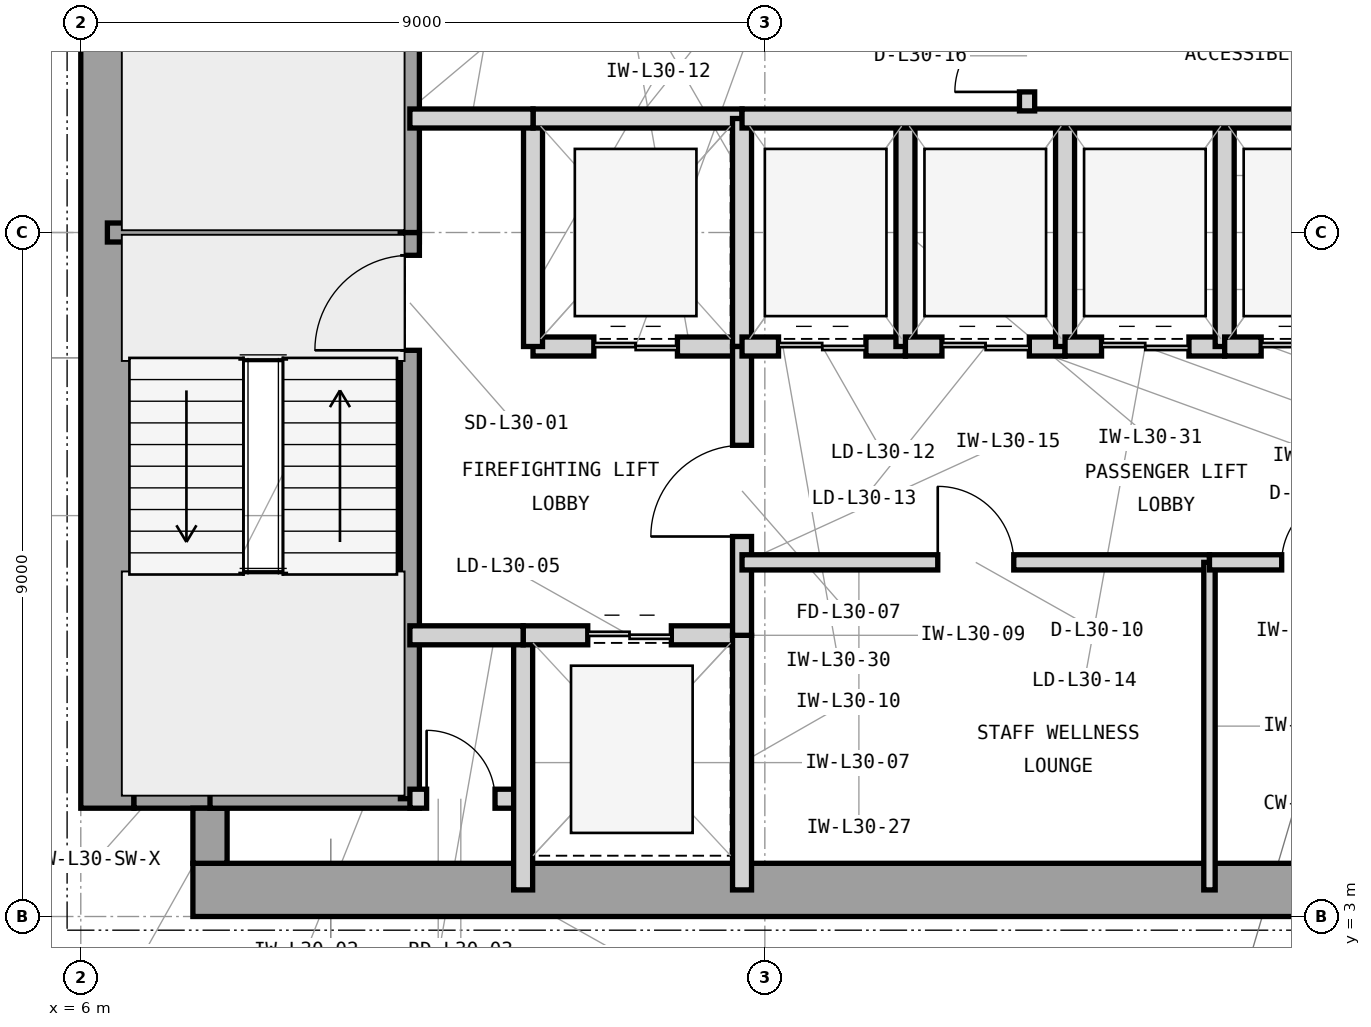
"""IFC4 building model, lengths in metres.
Left out: names, types, materials, properties, quantities, classifications, styles, units other than length and angle.
Written with IfcOpenShell. Run it as: python <this file> out.ifc"""

import sys

from ifc_helpers import new_model, si_unit, direction, frame, frame_2d, origin, place, context, subcontext, project, spatial, rectangle, extrude, element, fill, save


model = new_model("IFC4")
c1 = context("Model", 3, precision=1e-05, world=origin(), true_north=direction((0.0, 1.0)))
c2 = subcontext(c1, "Body", "Model", "MODEL_VIEW")
j1 = project(units=[si_unit("LENGTHUNIT", "METRE"), si_unit("PLANEANGLEUNIT", "RADIAN")], contexts=[c1])
p1 = place(None, origin())
s1 = spatial("IfcSite", under=j1, at=p1, CompositionType="ELEMENT")
p2 = place(p1, origin())
s2 = spatial("IfcBuilding", under=s1, at=p2, CompositionType="ELEMENT")
p3 = place(p2, frame((0.0, 0.0, 128.4)))
s3 = spatial("IfcBuildingStorey", under=s2, at=p3, CompositionType="ELEMENT", Elevation=128.4)
p4 = place(p3, frame((7.475, 3.35, 0.0), z_axis=(0.0, 0.0, 1.0), x_axis=(1.0, 0.0, 0.0)))
e1 = element("IfcWall", 1, at=p4, inside=s3, PredefinedType="SHEAR", context=c2, shape_type="SweptSolid", body=[
    extrude(rectangle(XDim=16.525, YDim=0.7, at=frame_2d((8.262, 0.0))), origin(), (0.0, 0.0, 1.0), 3.9),
])
p5 = place(p3, frame((6.35, 4.425, 0.0), z_axis=(0.0, 0.0, 1.0), x_axis=(0.0, 1.0, 0.0)))
e2 = element("IfcWall", 2, at=p5, inside=s3, PredefinedType="SHEAR", context=c2, shape_type="SweptSolid", body=[
    extrude(rectangle(XDim=15.15, YDim=0.7, at=frame_2d((7.575, 0.0))), origin(), (0.0, 0.0, 1.0), 3.9),
])
p6 = place(p3, frame((6.7, 4.65, 0.0), z_axis=(0.0, 0.0, 1.0), x_axis=(1.0, 0.0, 0.0)))
e3 = element("IfcWall", 3, at=p6, inside=s3, PredefinedType="SHEAR", context=c2, shape_type="SweptSolid", body=[
    extrude(rectangle(XDim=1.225, YDim=0.45, at=frame_2d((0.613, 0.0))), origin(), (0.0, 0.0, 1.0), 3.9),
])
p7 = place(p3, frame((7.7, 3.7, 0.0), z_axis=(0.0, 0.0, 1.0), x_axis=(0.0, 1.0, 0.0)))
e4 = element("IfcWall", 4, at=p7, inside=s3, PredefinedType="SHEAR", context=c2, shape_type="SweptSolid", body=[
    extrude(rectangle(XDim=0.725, YDim=0.45, at=frame_2d((0.363, 0.0))), origin(), (0.0, 0.0, 1.0), 3.9),
])
p8 = place(p3, frame((6.35, 12.0, 0.0), z_axis=(0.0, 0.0, 1.0), x_axis=(1.0, 0.0, 0.0)))
e5 = element("IfcWall", 5, at=p8, inside=s3, PredefinedType="SHEAR", context=c2, shape_type="SweptSolid", body=[
    extrude(rectangle(XDim=4.105, YDim=0.25, at=frame_2d((2.052, 0.0))), origin(), (0.0, 0.0, 1.0), 3.9),
])
p9 = place(p3, frame((7.7, 4.55, 0.0), z_axis=(0.0, 0.0, 1.0), x_axis=(1.0, 0.0, 0.0)))
e6 = element("IfcWall", 6, at=p9, inside=s3, PredefinedType="SHEAR", context=c2, shape_type="SweptSolid", body=[
    extrude(rectangle(XDim=2.755, YDim=0.25, at=frame_2d((1.377, 0.0))), origin(), (0.0, 0.0, 1.0), 3.9),
])
p10 = place(p3, frame((10.33, 4.55, 0.0), z_axis=(0.0, 0.0, 1.0), x_axis=(0.0, 1.0, 0.0)))
e7 = element("IfcWall", 7, at=p10, inside=s3, PredefinedType="SHEAR", context=c2, shape_type="SweptSolid", body=[
    extrude(rectangle(XDim=7.45, YDim=0.25, at=frame_2d((3.725, 0.0))), origin(), (0.0, 0.0, 1.0), 3.9),
])
p11 = place(p10, frame((5.9, 0.0, 0.0)))
e8 = element("IfcOpeningElement", 8, at=p11, cuts=e7, PredefinedType="OPENING", context=c2, shape_type="SweptSolid", body=[
    extrude(rectangle(XDim=1.25, YDim=2.2, at=frame_2d((0.625, 1.1))), frame((0.0, 0.135, 0.0), z_axis=(0.0, -1.0, 0.0), x_axis=(1.0, 0.0, 0.0)), (0.0, 0.0, 1.0), 0.27),
])
p12 = place(p3, frame((10.33, 12.0, 0.0), z_axis=(0.0, 0.0, 1.0), x_axis=(0.0, 1.0, 0.0)))
e9 = element("IfcWall", 9, at=p12, inside=s3, PredefinedType="SHEAR", context=c2, shape_type="SweptSolid", body=[
    extrude(rectangle(XDim=7.45, YDim=0.25, at=frame_2d((3.725, 0.0))), origin(), (0.0, 0.0, 1.0), 3.9),
])
p13 = place(p12, frame((5.85, 0.0, 0.0)))
e10 = element("IfcOpeningElement", 10, at=p13, cuts=e9, PredefinedType="OPENING", context=c2, shape_type="SweptSolid", body=[
    extrude(rectangle(XDim=1.25, YDim=2.2, at=frame_2d((0.625, 1.1))), frame((0.0, 0.135, 0.0), z_axis=(0.0, -1.0, 0.0), x_axis=(1.0, 0.0, 0.0)), (0.0, 0.0, 1.0), 0.27),
])
p14 = place(p3, frame((10.33, 4.55, 0.0), z_axis=(0.0, 0.0, 1.0), x_axis=(1.0, 0.0, 0.0)))
e11 = element("IfcWall", 11, at=p14, inside=s3, PredefinedType="PARTITIONING", context=c2, shape_type="SweptSolid", body=[
    extrude(rectangle(XDim=1.49, YDim=0.25, at=frame_2d((0.745, 0.0))), origin(), (0.0, 0.0, 1.0), 3.69),
])
p15 = place(p14, frame((0.22, 0.0, 0.0)))
e12 = element("IfcOpeningElement", 12, at=p15, cuts=e11, PredefinedType="OPENING", context=c2, shape_type="SweptSolid", body=[
    extrude(rectangle(XDim=0.9, YDim=2.1, at=frame_2d((0.45, 1.05))), frame((0.0, 0.135, 0.0), z_axis=(0.0, -1.0, 0.0), x_axis=(1.0, 0.0, 0.0)), (0.0, 0.0, 1.0), 0.27),
])
p16 = place(p3, frame((11.82, 3.35, 0.0), z_axis=(0.0, 0.0, 1.0), x_axis=(0.0, 1.0, 0.0)))
e13 = element("IfcWall", 13, at=p16, inside=s3, PredefinedType="PARTITIONING", context=c2, shape_type="SweptSolid", body=[
    extrude(rectangle(XDim=3.35, YDim=0.25, at=frame_2d((1.675, 0.0))), origin(), (0.0, 0.0, 1.0), 3.69),
])
p17 = place(p3, frame((11.82, 6.7, 0.0), z_axis=(0.0, 0.0, 1.0), x_axis=(1.0, 0.0, 0.0)))
e14 = element("IfcWall", 14, at=p17, inside=s3, PredefinedType="PARTITIONING", context=c2, shape_type="SweptSolid", body=[
    extrude(rectangle(XDim=2.88, YDim=0.25, at=frame_2d((1.44, 0.0))), origin(), (0.0, 0.0, 1.0), 3.233),
])
p18 = place(p17, frame((0.85, 0.0, 0.0)))
e15 = element("IfcOpeningElement", 15, at=p18, cuts=e14, PredefinedType="OPENING", context=c2, shape_type="SweptSolid", body=[
    extrude(rectangle(XDim=1.1, YDim=2.25, at=frame_2d((0.55, 1.125))), frame((0.0, 0.135, 0.0), z_axis=(0.0, -1.0, 0.0), x_axis=(1.0, 0.0, 0.0)), (0.0, 0.0, 1.0), 0.27),
])
p19 = place(p3, frame((14.7, 3.35, 0.0), z_axis=(0.0, 0.0, 1.0), x_axis=(0.0, 1.0, 0.0)))
e16 = element("IfcWall", 16, at=p19, inside=s3, PredefinedType="PARTITIONING", context=c2, shape_type="SweptSolid", body=[
    extrude(rectangle(XDim=3.35, YDim=0.25, at=frame_2d((1.675, 0.0))), origin(), (0.0, 0.0, 1.0), 3.69),
])
p20 = place(p3, frame((11.95, 10.5, 0.0), z_axis=(0.0, 0.0, 1.0), x_axis=(1.0, 0.0, 0.0)))
e17 = element("IfcWall", 17, at=p20, inside=s3, PredefinedType="PARTITIONING", context=c2, shape_type="SweptSolid", body=[
    extrude(rectangle(XDim=2.75, YDim=0.25, at=frame_2d((1.375, 0.0))), origin(), (0.0, 0.0, 1.0), 3.233),
])
p21 = place(p20, frame((0.8, 0.0, 0.0)))
e18 = element("IfcOpeningElement", 18, at=p21, cuts=e17, PredefinedType="OPENING", context=c2, shape_type="SweptSolid", body=[
    extrude(rectangle(XDim=1.1, YDim=2.25, at=frame_2d((0.55, 1.125))), frame((0.0, 0.135, 0.0), z_axis=(0.0, -1.0, 0.0), x_axis=(1.0, 0.0, 0.0)), (0.0, 0.0, 1.0), 0.27),
])
p22 = place(p3, frame((11.95, 10.5, 0.0), z_axis=(0.0, 0.0, 1.0), x_axis=(0.0, 1.0, 0.0)))
e19 = element("IfcWall", 19, at=p22, inside=s3, PredefinedType="PARTITIONING", context=c2, shape_type="SweptSolid", body=[
    extrude(rectangle(XDim=3.0, YDim=0.25, at=frame_2d((1.5, 0.0))), origin(), (0.0, 0.0, 1.0), 3.69),
])
p23 = place(p3, frame((11.95, 13.5, 0.0), z_axis=(0.0, 0.0, 1.0), x_axis=(1.0, 0.0, 0.0)))
e20 = element("IfcWall", 20, at=p23, inside=s3, PredefinedType="PARTITIONING", context=c2, shape_type="SweptSolid", body=[
    extrude(rectangle(XDim=2.75, YDim=0.25, at=frame_2d((1.375, 0.0))), origin(), (0.0, 0.0, 1.0), 3.233),
])
p24 = place(p3, frame((14.7, 10.5, 0.0), z_axis=(0.0, 0.0, 1.0), x_axis=(0.0, 1.0, 0.0)))
e21 = element("IfcWall", 21, at=p24, inside=s3, PredefinedType="PARTITIONING", context=c2, shape_type="SweptSolid", body=[
    extrude(rectangle(XDim=3.0, YDim=0.25, at=frame_2d((1.5, 0.0))), origin(), (0.0, 0.0, 1.0), 3.69),
])
p25 = place(p3, frame((14.7, 6.7, 0.0), z_axis=(0.0, 0.0, 1.0), x_axis=(0.0, 1.0, 0.0)))
e22 = element("IfcWall", 22, at=p25, inside=s3, PredefinedType="PARTITIONING", context=c2, shape_type="SweptSolid", body=[
    extrude(rectangle(XDim=3.8, YDim=0.25, at=frame_2d((1.9, 0.0))), origin(), (0.0, 0.0, 1.0), 3.69),
])
p26 = place(p25, frame((1.3, 0.0, 0.0)))
e23 = element("IfcOpeningElement", 23, at=p26, cuts=e22, PredefinedType="OPENING", context=c2, shape_type="SweptSolid", body=[
    extrude(rectangle(XDim=1.2, YDim=2.2, at=frame_2d((0.6, 1.1))), frame((0.0, 0.135, 0.0), z_axis=(0.0, -1.0, 0.0), x_axis=(1.0, 0.0, 0.0)), (0.0, 0.0, 1.0), 0.27),
])
p27 = place(p3, frame((10.33, 13.5, 0.0), z_axis=(0.0, 0.0, 1.0), x_axis=(1.0, 0.0, 0.0)))
e24 = element("IfcWall", 24, at=p27, inside=s3, PredefinedType="PARTITIONING", context=c2, shape_type="SweptSolid", body=[
    extrude(rectangle(XDim=1.62, YDim=0.25, at=frame_2d((0.81, 0.0))), origin(), (0.0, 0.0, 1.0), 3.233),
])
p28 = place(p3, frame((10.33, 6.7, 0.0), z_axis=(0.0, 0.0, 1.0), x_axis=(1.0, 0.0, 0.0)))
e25 = element("IfcWall", 25, at=p28, inside=s3, PredefinedType="PARTITIONING", context=c2, shape_type="SweptSolid", body=[
    extrude(rectangle(XDim=1.49, YDim=0.25, at=frame_2d((0.745, 0.0))), origin(), (0.0, 0.0, 1.0), 3.233),
])
p29 = place(p3, frame((14.7, 7.66, 0.0), z_axis=(0.0, 0.0, 1.0), x_axis=(1.0, 0.0, 0.0)))
e26 = element("IfcWall", 26, at=p29, inside=s3, PredefinedType="PARTITIONING", context=c2, shape_type="SweptSolid", body=[
    extrude(rectangle(XDim=6.15, YDim=0.2, at=frame_2d((3.075, 0.0))), origin(), (0.0, 0.0, 1.0), 3.69),
])
p30 = place(p29, frame((2.575, 0.0, 0.0)))
e27 = element("IfcOpeningElement", 27, at=p30, cuts=e26, PredefinedType="OPENING", context=c2, shape_type="SweptSolid", body=[
    extrude(rectangle(XDim=1.0, YDim=2.15, at=frame_2d((0.5, 1.075))), frame((0.0, 0.11, 0.0), z_axis=(0.0, -1.0, 0.0), x_axis=(1.0, 0.0, 0.0)), (0.0, 0.0, 1.0), 0.22),
])
p31 = place(p3, frame((20.85, 3.35, 0.0), z_axis=(0.0, 0.0, 1.0), x_axis=(0.0, 1.0, 0.0)))
e28 = element("IfcWall", 28, at=p31, inside=s3, PredefinedType="PARTITIONING", context=c2, shape_type="SweptSolid", body=[
    extrude(rectangle(XDim=4.31, YDim=0.15, at=frame_2d((2.155, 0.0))), origin(), (0.0, 0.0, 1.0), 3.69),
])
p32 = place(p3, frame((20.85, 7.66, 0.0), z_axis=(0.0, 0.0, 1.0), x_axis=(1.0, 0.0, 0.0)))
e29 = element("IfcWall", 29, at=p32, inside=s3, PredefinedType="PARTITIONING", context=c2, shape_type="SweptSolid", body=[
    extrude(rectangle(XDim=2.8, YDim=0.2, at=frame_2d((1.4, 0.0))), origin(), (0.0, 0.0, 1.0), 3.69),
])
p33 = place(p32, frame((0.95, 0.0, 0.0)))
e30 = element("IfcOpeningElement", 30, at=p33, cuts=e29, PredefinedType="OPENING", context=c2, shape_type="SweptSolid", body=[
    extrude(rectangle(XDim=0.9, YDim=2.1, at=frame_2d((0.45, 1.05))), frame((0.0, 0.11, 0.0), z_axis=(0.0, -1.0, 0.0), x_axis=(1.0, 0.0, 0.0)), (0.0, 0.0, 1.0), 0.22),
])
p34 = place(p3, frame((14.7, 10.5, 0.0), z_axis=(0.0, 0.0, 1.0), x_axis=(1.0, 0.0, 0.0)))
e31 = element("IfcWall", 31, at=p34, inside=s3, PredefinedType="PARTITIONING", context=c2, shape_type="SweptSolid", body=[
    extrude(rectangle(XDim=2.15, YDim=0.25, at=frame_2d((1.075, 0.0))), origin(), (0.0, 0.0, 1.0), 3.233),
])
p35 = place(p34, frame((0.48, 0.0, 0.0)))
e32 = element("IfcOpeningElement", 32, at=p35, cuts=e31, PredefinedType="OPENING", context=c2, shape_type="SweptSolid", body=[
    extrude(rectangle(XDim=1.15, YDim=2.25, at=frame_2d((0.575, 1.125))), frame((0.0, 0.135, 0.0), z_axis=(0.0, -1.0, 0.0), x_axis=(1.0, 0.0, 0.0)), (0.0, 0.0, 1.0), 0.27),
])
p36 = place(p3, frame((16.85, 10.5, 0.0), z_axis=(0.0, 0.0, 1.0), x_axis=(0.0, 1.0, 0.0)))
e33 = element("IfcWall", 33, at=p36, inside=s3, PredefinedType="PARTITIONING", context=c2, shape_type="SweptSolid", body=[
    extrude(rectangle(XDim=3.0, YDim=0.25, at=frame_2d((1.5, 0.0))), origin(), (0.0, 0.0, 1.0), 3.69),
])
p37 = place(p3, frame((16.85, 10.5, 0.0), z_axis=(0.0, 0.0, 1.0), x_axis=(1.0, 0.0, 0.0)))
e34 = element("IfcWall", 34, at=p37, inside=s3, PredefinedType="PARTITIONING", context=c2, shape_type="SweptSolid", body=[
    extrude(rectangle(XDim=2.1, YDim=0.25, at=frame_2d((1.05, 0.0))), origin(), (0.0, 0.0, 1.0), 3.233),
])
p38 = place(p37, frame((0.48, 0.0, 0.0)))
e35 = element("IfcOpeningElement", 35, at=p38, cuts=e34, PredefinedType="OPENING", context=c2, shape_type="SweptSolid", body=[
    extrude(rectangle(XDim=1.15, YDim=2.25, at=frame_2d((0.575, 1.125))), frame((0.0, 0.135, 0.0), z_axis=(0.0, -1.0, 0.0), x_axis=(1.0, 0.0, 0.0)), (0.0, 0.0, 1.0), 0.27),
])
p39 = place(p3, frame((18.95, 10.5, 0.0), z_axis=(0.0, 0.0, 1.0), x_axis=(0.0, 1.0, 0.0)))
e36 = element("IfcWall", 36, at=p39, inside=s3, PredefinedType="PARTITIONING", context=c2, shape_type="SweptSolid", body=[
    extrude(rectangle(XDim=3.0, YDim=0.25, at=frame_2d((1.5, 0.0))), origin(), (0.0, 0.0, 1.0), 3.69),
])
p40 = place(p3, frame((18.95, 10.5, 0.0), z_axis=(0.0, 0.0, 1.0), x_axis=(1.0, 0.0, 0.0)))
e37 = element("IfcWall", 37, at=p40, inside=s3, PredefinedType="PARTITIONING", context=c2, shape_type="SweptSolid", body=[
    extrude(rectangle(XDim=2.1, YDim=0.25, at=frame_2d((1.05, 0.0))), origin(), (0.0, 0.0, 1.0), 3.233),
])
p41 = place(p40, frame((0.48, 0.0, 0.0)))
e38 = element("IfcOpeningElement", 38, at=p41, cuts=e37, PredefinedType="OPENING", context=c2, shape_type="SweptSolid", body=[
    extrude(rectangle(XDim=1.15, YDim=2.25, at=frame_2d((0.575, 1.125))), frame((0.0, 0.135, 0.0), z_axis=(0.0, -1.0, 0.0), x_axis=(1.0, 0.0, 0.0)), (0.0, 0.0, 1.0), 0.27),
])
p42 = place(p3, frame((21.05, 10.5, 0.0), z_axis=(0.0, 0.0, 1.0), x_axis=(0.0, 1.0, 0.0)))
e39 = element("IfcWall", 39, at=p42, inside=s3, PredefinedType="PARTITIONING", context=c2, shape_type="SweptSolid", body=[
    extrude(rectangle(XDim=3.0, YDim=0.25, at=frame_2d((1.5, 0.0))), origin(), (0.0, 0.0, 1.0), 3.69),
])
p43 = place(p3, frame((21.05, 10.5, 0.0), z_axis=(0.0, 0.0, 1.0), x_axis=(1.0, 0.0, 0.0)))
e40 = element("IfcWall", 40, at=p43, inside=s3, PredefinedType="PARTITIONING", context=c2, shape_type="SweptSolid", body=[
    extrude(rectangle(XDim=2.4, YDim=0.25, at=frame_2d((1.2, 0.0))), origin(), (0.0, 0.0, 1.0), 3.233),
])
p44 = place(p43, frame((0.48, 0.0, 0.0)))
e41 = element("IfcOpeningElement", 41, at=p44, cuts=e40, PredefinedType="OPENING", context=c2, shape_type="SweptSolid", body=[
    extrude(rectangle(XDim=1.15, YDim=2.25, at=frame_2d((0.575, 1.125))), frame((0.0, 0.135, 0.0), z_axis=(0.0, -1.0, 0.0), x_axis=(1.0, 0.0, 0.0)), (0.0, 0.0, 1.0), 0.27),
])
p45 = place(p3, frame((14.7, 13.5, 0.0), z_axis=(0.0, 0.0, 1.0), x_axis=(1.0, 0.0, 0.0)))
e42 = element("IfcWall", 42, at=p45, inside=s3, PredefinedType="PARTITIONING", context=c2, shape_type="SweptSolid", body=[
    extrude(rectangle(XDim=8.95, YDim=0.25, at=frame_2d((4.475, 0.0))), origin(), (0.0, 0.0, 1.0), 3.233),
])
p46 = place(p3, frame((18.45, 13.6, 0.0), z_axis=(0.0, 0.0, 1.0), x_axis=(0.0, 1.0, 0.0)))
e43 = element("IfcWall", 43, at=p46, inside=s3, PredefinedType="PARTITIONING", context=c2, shape_type="SweptSolid", body=[
    extrude(rectangle(XDim=3.0, YDim=0.2, at=frame_2d((1.5, 0.0))), origin(), (0.0, 0.0, 1.0), 3.69),
])
p47 = place(p46, frame((0.25, 0.0, 0.0)))
e44 = element("IfcOpeningElement", 44, at=p47, cuts=e43, PredefinedType="OPENING", context=c2, shape_type="SweptSolid", body=[
    extrude(rectangle(XDim=0.95, YDim=2.1, at=frame_2d((0.475, 1.05))), frame((0.0, 0.11, 0.0), z_axis=(0.0, -1.0, 0.0), x_axis=(1.0, 0.0, 0.0)), (0.0, 0.0, 1.0), 0.22),
])
p48 = place(p46, frame((1.8, 0.0, 0.0)))
e45 = element("IfcOpeningElement", 45, at=p48, cuts=e43, PredefinedType="OPENING", context=c2, shape_type="SweptSolid", body=[
    extrude(rectangle(XDim=0.95, YDim=2.1, at=frame_2d((0.475, 1.05))), frame((0.0, 0.11, 0.0), z_axis=(0.0, -1.0, 0.0), x_axis=(1.0, 0.0, 0.0)), (0.0, 0.0, 1.0), 0.22),
])
p49 = place(p11, origin())
e46 = element("IfcDoor", 46, at=p49, inside=s3, OperationType="SINGLE_SWING_LEFT", PredefinedType="DOOR", context=c2, shape_type="SweptSolid", body=[
    extrude(rectangle(XDim=1.25, YDim=2.2, at=frame_2d((0.625, 1.1))), frame((0.0, 0.025, 0.0), z_axis=(0.0, -1.0, 0.0), x_axis=(1.0, 0.0, 0.0)), (0.0, 0.0, 1.0), 0.05),
])
fill(e8, e46)
p50 = place(p15, origin())
e47 = element("IfcDoor", 47, at=p50, inside=s3, OperationType="SINGLE_SWING_LEFT", PredefinedType="TRAPDOOR", context=c2, shape_type="SweptSolid", body=[
    extrude(rectangle(XDim=0.9, YDim=2.1, at=frame_2d((0.45, 1.05))), frame((0.0, 0.025, 0.0), z_axis=(0.0, -1.0, 0.0), x_axis=(1.0, 0.0, 0.0)), (0.0, 0.0, 1.0), 0.05),
])
fill(e12, e47)
p51 = place(p18, origin())
e48 = element("IfcDoor", 48, at=p51, inside=s3, OperationType="DOUBLE_DOOR_SLIDING", PredefinedType="DOOR", context=c2, shape_type="SweptSolid", body=[
    extrude(rectangle(XDim=1.1, YDim=2.25, at=frame_2d((0.55, 1.125))), frame((0.0, 0.025, 0.0), z_axis=(0.0, -1.0, 0.0), x_axis=(1.0, 0.0, 0.0)), (0.0, 0.0, 1.0), 0.05),
])
fill(e15, e48)
p52 = place(p21, origin())
e49 = element("IfcDoor", 49, at=p52, inside=s3, OperationType="DOUBLE_DOOR_SLIDING", PredefinedType="DOOR", context=c2, shape_type="SweptSolid", body=[
    extrude(rectangle(XDim=1.1, YDim=2.25, at=frame_2d((0.55, 1.125))), frame((0.0, 0.025, 0.0), z_axis=(0.0, -1.0, 0.0), x_axis=(1.0, 0.0, 0.0)), (0.0, 0.0, 1.0), 0.05),
])
fill(e18, e49)
p53 = place(p26, origin())
e50 = element("IfcDoor", 50, at=p53, inside=s3, OperationType="SINGLE_SWING_LEFT", PredefinedType="DOOR", context=c2, shape_type="SweptSolid", body=[
    extrude(rectangle(XDim=1.2, YDim=2.2, at=frame_2d((0.6, 1.1))), frame((0.0, 0.025, 0.0), z_axis=(0.0, -1.0, 0.0), x_axis=(1.0, 0.0, 0.0)), (0.0, 0.0, 1.0), 0.05),
])
fill(e23, e50)
p54 = place(p30, origin())
e51 = element("IfcDoor", 51, at=p54, inside=s3, OperationType="SINGLE_SWING_LEFT", PredefinedType="DOOR", context=c2, shape_type="SweptSolid", body=[
    extrude(rectangle(XDim=1.0, YDim=2.15, at=frame_2d((0.5, 1.075))), frame((0.0, 0.025, 0.0), z_axis=(0.0, -1.0, 0.0), x_axis=(1.0, 0.0, 0.0)), (0.0, 0.0, 1.0), 0.05),
])
fill(e27, e51)
p55 = place(p33, origin())
e52 = element("IfcDoor", 52, at=p55, inside=s3, OperationType="SINGLE_SWING_RIGHT", PredefinedType="TRAPDOOR", context=c2, shape_type="SweptSolid", body=[
    extrude(rectangle(XDim=0.9, YDim=2.1, at=frame_2d((0.45, 1.05))), frame((0.0, 0.025, 0.0), z_axis=(0.0, -1.0, 0.0), x_axis=(1.0, 0.0, 0.0)), (0.0, 0.0, 1.0), 0.05),
])
fill(e30, e52)
p56 = place(p35, origin())
e53 = element("IfcDoor", 53, at=p56, inside=s3, OperationType="DOUBLE_DOOR_SLIDING", PredefinedType="DOOR", context=c2, shape_type="SweptSolid", body=[
    extrude(rectangle(XDim=1.15, YDim=2.25, at=frame_2d((0.575, 1.125))), frame((0.0, 0.025, 0.0), z_axis=(0.0, -1.0, 0.0), x_axis=(1.0, 0.0, 0.0)), (0.0, 0.0, 1.0), 0.05),
])
fill(e32, e53)
p57 = place(p38, origin())
e54 = element("IfcDoor", 54, at=p57, inside=s3, OperationType="DOUBLE_DOOR_SLIDING", PredefinedType="DOOR", context=c2, shape_type="SweptSolid", body=[
    extrude(rectangle(XDim=1.15, YDim=2.25, at=frame_2d((0.575, 1.125))), frame((0.0, 0.025, 0.0), z_axis=(0.0, -1.0, 0.0), x_axis=(1.0, 0.0, 0.0)), (0.0, 0.0, 1.0), 0.05),
])
fill(e35, e54)
p58 = place(p41, origin())
e55 = element("IfcDoor", 55, at=p58, inside=s3, OperationType="DOUBLE_DOOR_SLIDING", PredefinedType="DOOR", context=c2, shape_type="SweptSolid", body=[
    extrude(rectangle(XDim=1.15, YDim=2.25, at=frame_2d((0.575, 1.125))), frame((0.0, 0.025, 0.0), z_axis=(0.0, -1.0, 0.0), x_axis=(1.0, 0.0, 0.0)), (0.0, 0.0, 1.0), 0.05),
])
fill(e38, e55)
p59 = place(p44, origin())
e56 = element("IfcDoor", 56, at=p59, inside=s3, OperationType="DOUBLE_DOOR_SLIDING", PredefinedType="DOOR", context=c2, shape_type="SweptSolid", body=[
    extrude(rectangle(XDim=1.15, YDim=2.25, at=frame_2d((0.575, 1.125))), frame((0.0, 0.025, 0.0), z_axis=(0.0, -1.0, 0.0), x_axis=(1.0, 0.0, 0.0)), (0.0, 0.0, 1.0), 0.05),
])
fill(e41, e56)
p60 = place(p47, origin())
e57 = element("IfcDoor", 57, at=p60, inside=s3, OperationType="SINGLE_SWING_LEFT", PredefinedType="DOOR", context=c2, shape_type="SweptSolid", body=[
    extrude(rectangle(XDim=0.95, YDim=2.1, at=frame_2d((0.475, 1.05))), frame((0.0, 0.025, 0.0), z_axis=(0.0, -1.0, 0.0), x_axis=(1.0, 0.0, 0.0)), (0.0, 0.0, 1.0), 0.05),
])
fill(e44, e57)
save(model, sys.argv[1])
